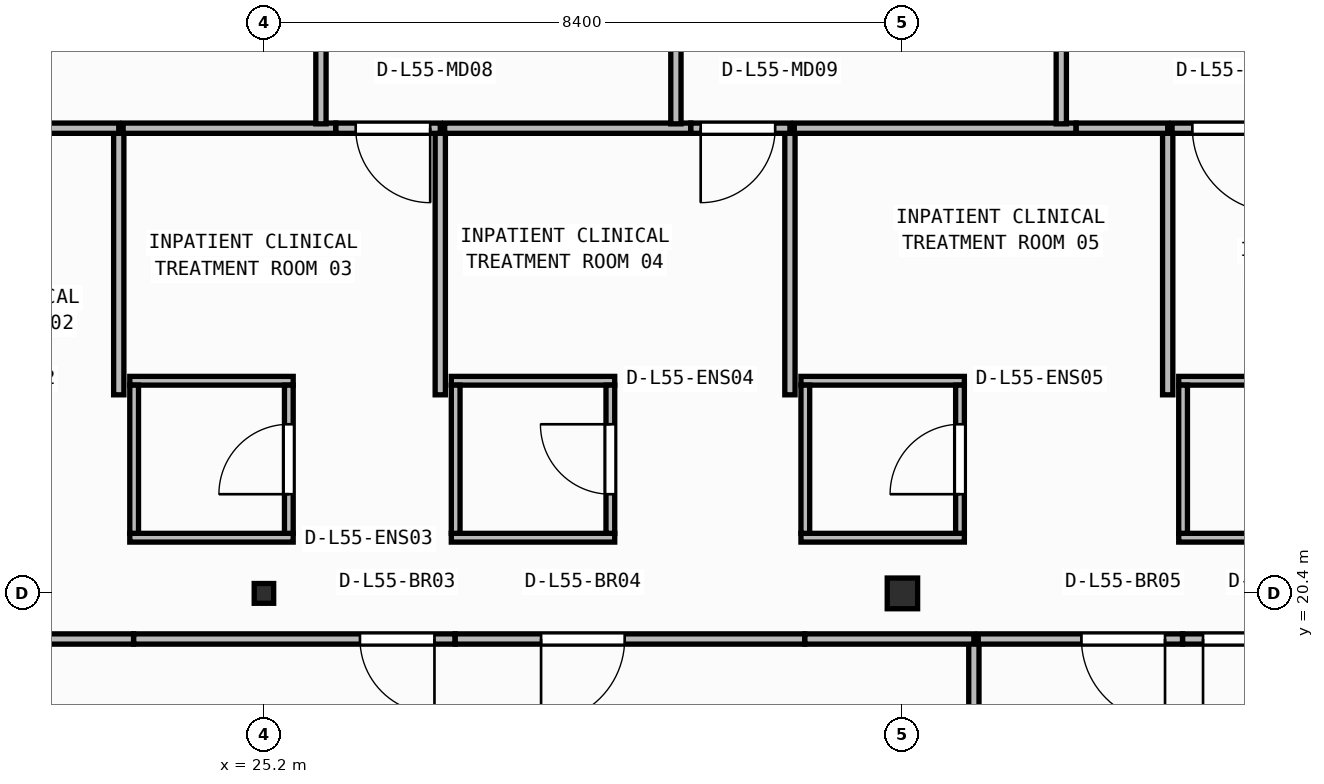
"""IFC4 building model, lengths in metres.
Left out: names, types, materials, properties, quantities, classifications, styles, units other than length and angle.
Written with IfcOpenShell. Run it as: python <this file> out.ifc"""

import sys

from ifc_helpers import new_model, si_unit, direction, frame, frame_2d, origin, origin_2d, place, context, subcontext, project, spatial, rectangle, i_section, extrude, element, fill, save


model = new_model("IFC4")
c1 = context("Model", 3, precision=1e-05, world=origin(), true_north=direction((0.0, 1.0)))
c2 = subcontext(c1, "Body", "Model", "MODEL_VIEW")
j1 = project(units=[si_unit("LENGTHUNIT", "METRE"), si_unit("PLANEANGLEUNIT", "RADIAN")], contexts=[c1])
p1 = place(None, origin())
s1 = spatial("IfcSite", under=j1, at=p1, CompositionType="ELEMENT")
p2 = place(p1, origin())
s2 = spatial("IfcBuilding", under=s1, at=p2, CompositionType="ELEMENT")
p3 = place(p2, frame((0.0, 0.0, 223.7)))
s3 = spatial("IfcBuildingStorey", under=s2, at=p3, CompositionType="ELEMENT", Elevation=223.7)
p4 = place(p3, frame((25.2, 20.4, 0.0), z_axis=(0.0, 0.0, 1.0), x_axis=(1.0, 0.0, 0.0)))
e1 = element("IfcColumn", 1, at=p4, inside=s3, PredefinedType="COLUMN", context=c2, shape_type="SweptSolid", body=[
    extrude(i_section(OverallWidth=0.256, OverallDepth=0.26, WebThickness=0.01, FlangeThickness=0.017, FilletRadius=0.013, at=origin_2d()), origin(), (0.0, 0.0, 1.0), 3.95),
])
p5 = place(p3, frame((33.6, 20.4, 0.0), z_axis=(0.0, 0.0, 1.0), x_axis=(1.0, 0.0, 0.0)))
e2 = element("IfcColumn", 2, at=p5, inside=s3, PredefinedType="COLUMN", context=c2, shape_type="SweptSolid", body=[
    extrude(i_section(OverallWidth=0.4, OverallDepth=0.404, WebThickness=0.02, FlangeThickness=0.032, at=origin_2d()), origin(), (0.0, 0.0, 1.0), 3.95),
])
for number, where, z_axis, x_axis in (
    (3, (23.435, 21.133, 0.0), (0.0, 0.0, 1.0), (1.0, 0.0, 0.0)),
    (4, (23.435, 23.198, 0.0), (0.0, 0.0, 1.0), (1.0, 0.0, 0.0)),
):
    element("IfcWall", number, at=place(p3, frame(where, z_axis=z_axis, x_axis=x_axis)), inside=s3, PredefinedType="PARTITIONING", context=c2, shape_type="SweptSolid", body=[
        extrude(rectangle(XDim=2.15, YDim=0.115, at=frame_2d((1.075, 0.0))), origin(), (0.0, 0.0, 1.0), 3.71),
    ])
p6 = place(p3, frame((23.492, 21.19, 0.0), z_axis=(0.0, 0.0, 1.0), x_axis=(0.0, 1.0, 0.0)))
e5 = element("IfcWall", 5, at=p6, inside=s3, PredefinedType="PARTITIONING", context=c2, shape_type="SweptSolid", body=[
    extrude(rectangle(XDim=1.95, YDim=0.115, at=frame_2d((0.975, 0.0))), origin(), (0.0, 0.0, 1.0), 3.71),
])
p7 = place(p3, frame((25.528, 21.19, 0.0), z_axis=(0.0, 0.0, 1.0), x_axis=(0.0, 1.0, 0.0)))
e6 = element("IfcWall", 6, at=p7, inside=s3, PredefinedType="PARTITIONING", context=c2, shape_type="SweptSolid", body=[
    extrude(rectangle(XDim=1.95, YDim=0.115, at=frame_2d((0.975, 0.0))), origin(), (0.0, 0.0, 1.0), 3.157),
])
p8 = place(p7, frame((0.515, 0.0, 0.0)))
e7 = element("IfcOpeningElement", 7, at=p8, cuts=e6, PredefinedType="OPENING", context=c2, shape_type="SweptSolid", body=[
    extrude(rectangle(XDim=0.92, YDim=2.1, at=frame_2d((0.46, 1.05))), frame((0.0, 0.067, 0.0), z_axis=(0.0, -1.0, 0.0), x_axis=(1.0, 0.0, 0.0)), (0.0, 0.0, 1.0), 0.135),
])
for number, where, z_axis, x_axis in (
    (8, (27.665, 21.133, 0.0), (0.0, 0.0, 1.0), (1.0, 0.0, 0.0)),
    (9, (27.665, 23.198, 0.0), (0.0, 0.0, 1.0), (1.0, 0.0, 0.0)),
):
    element("IfcWall", number, at=place(p3, frame(where, z_axis=z_axis, x_axis=x_axis)), inside=s3, PredefinedType="PARTITIONING", context=c2, shape_type="SweptSolid", body=[
        extrude(rectangle(XDim=2.15, YDim=0.115, at=frame_2d((1.075, 0.0))), origin(), (0.0, 0.0, 1.0), 3.71),
    ])
p9 = place(p3, frame((27.722, 21.19, 0.0), z_axis=(0.0, 0.0, 1.0), x_axis=(0.0, 1.0, 0.0)))
e10 = element("IfcWall", 10, at=p9, inside=s3, PredefinedType="PARTITIONING", context=c2, shape_type="SweptSolid", body=[
    extrude(rectangle(XDim=1.95, YDim=0.115, at=frame_2d((0.975, 0.0))), origin(), (0.0, 0.0, 1.0), 3.71),
])
p10 = place(p3, frame((29.758, 21.19, 0.0), z_axis=(0.0, 0.0, 1.0), x_axis=(0.0, 1.0, 0.0)))
e11 = element("IfcWall", 11, at=p10, inside=s3, PredefinedType="PARTITIONING", context=c2, shape_type="SweptSolid", body=[
    extrude(rectangle(XDim=1.95, YDim=0.115, at=frame_2d((0.975, 0.0))), origin(), (0.0, 0.0, 1.0), 3.71),
])
p11 = place(p10, frame((0.515, 0.0, 0.0)))
e12 = element("IfcOpeningElement", 12, at=p11, cuts=e11, PredefinedType="OPENING", context=c2, shape_type="SweptSolid", body=[
    extrude(rectangle(XDim=0.92, YDim=2.1, at=frame_2d((0.46, 1.05))), frame((0.0, 0.067, 0.0), z_axis=(0.0, -1.0, 0.0), x_axis=(1.0, 0.0, 0.0)), (0.0, 0.0, 1.0), 0.135),
])
for number, where, z_axis, x_axis in (
    (13, (32.265, 21.133, 0.0), (0.0, 0.0, 1.0), (1.0, 0.0, 0.0)),
    (14, (32.265, 23.198, 0.0), (0.0, 0.0, 1.0), (1.0, 0.0, 0.0)),
):
    element("IfcWall", number, at=place(p3, frame(where, z_axis=z_axis, x_axis=x_axis)), inside=s3, PredefinedType="PARTITIONING", context=c2, shape_type="SweptSolid", body=[
        extrude(rectangle(XDim=2.15, YDim=0.115, at=frame_2d((1.075, 0.0))), origin(), (0.0, 0.0, 1.0), 3.71),
    ])
p12 = place(p3, frame((32.323, 21.19, 0.0), z_axis=(0.0, 0.0, 1.0), x_axis=(0.0, 1.0, 0.0)))
e15 = element("IfcWall", 15, at=p12, inside=s3, PredefinedType="PARTITIONING", context=c2, shape_type="SweptSolid", body=[
    extrude(rectangle(XDim=1.95, YDim=0.115, at=frame_2d((0.975, 0.0))), origin(), (0.0, 0.0, 1.0), 3.71),
])
p13 = place(p3, frame((34.357, 21.19, 0.0), z_axis=(0.0, 0.0, 1.0), x_axis=(0.0, 1.0, 0.0)))
e16 = element("IfcWall", 16, at=p13, inside=s3, PredefinedType="PARTITIONING", context=c2, shape_type="SweptSolid", body=[
    extrude(rectangle(XDim=1.95, YDim=0.115, at=frame_2d((0.975, 0.0))), origin(), (0.0, 0.0, 1.0), 3.71),
])
p14 = place(p13, frame((0.515, 0.0, 0.0)))
e17 = element("IfcOpeningElement", 17, at=p14, cuts=e16, PredefinedType="OPENING", context=c2, shape_type="SweptSolid", body=[
    extrude(rectangle(XDim=0.92, YDim=2.1, at=frame_2d((0.46, 1.05))), frame((0.0, 0.067, 0.0), z_axis=(0.0, -1.0, 0.0), x_axis=(1.0, 0.0, 0.0)), (0.0, 0.0, 1.0), 0.135),
])
for number, where, z_axis, x_axis in (
    (18, (37.235, 21.133, 0.0), (0.0, 0.0, 1.0), (1.0, 0.0, 0.0)),
    (19, (37.235, 23.198, 0.0), (0.0, 0.0, 1.0), (1.0, 0.0, 0.0)),
):
    element("IfcWall", number, at=place(p3, frame(where, z_axis=z_axis, x_axis=x_axis)), inside=s3, PredefinedType="PARTITIONING", context=c2, shape_type="SweptSolid", body=[
        extrude(rectangle(XDim=2.15, YDim=0.115, at=frame_2d((1.075, 0.0))), origin(), (0.0, 0.0, 1.0), 3.71),
    ])
p15 = place(p3, frame((37.292, 21.19, 0.0), z_axis=(0.0, 0.0, 1.0), x_axis=(0.0, 1.0, 0.0)))
e20 = element("IfcWall", 20, at=p15, inside=s3, PredefinedType="PARTITIONING", context=c2, shape_type="SweptSolid", body=[
    extrude(rectangle(XDim=1.95, YDim=0.115, at=frame_2d((0.975, 0.0))), origin(), (0.0, 0.0, 1.0), 3.71),
])
p16 = place(p3, frame((34.54, 14.76, 0.0), z_axis=(0.0, 0.0, 1.0), x_axis=(0.0, 1.0, 0.0)))
e21 = element("IfcWall", 21, at=p16, inside=s3, PredefinedType="PARTITIONING", context=c2, shape_type="SweptSolid", body=[
    extrude(rectangle(XDim=5.04, YDim=0.135, at=frame_2d((2.52, 0.0))), origin(), (0.0, 0.0, 1.0), 3.71),
])
p17 = place(p3, frame((23.485, 19.8, 0.0), z_axis=(0.0, 0.0, 1.0), x_axis=(-1.0, 0.0, 0.0)))
e22 = element("IfcWall", 22, at=p17, inside=s3, PredefinedType="PARTITIONING", context=c2, shape_type="SweptSolid", body=[
    extrude(rectangle(XDim=4.968, YDim=0.135, at=frame_2d((2.484, 0.0))), origin(), (0.0, 0.0, 1.0), 3.71),
])
p18 = place(p17, frame((1.934, 0.0, 0.0)))
e23 = element("IfcOpeningElement", 23, at=p18, cuts=e22, PredefinedType="OPENING", context=c2, shape_type="SweptSolid", body=[
    extrude(rectangle(XDim=1.1, YDim=2.1, at=frame_2d((0.55, 1.05))), frame((0.0, 0.077, 0.0), z_axis=(0.0, -1.0, 0.0), x_axis=(1.0, 0.0, 0.0)), (0.0, 0.0, 1.0), 0.155),
])
p19 = place(p3, frame((27.715, 19.8, 0.0), z_axis=(0.0, 0.0, 1.0), x_axis=(-1.0, 0.0, 0.0)))
e24 = element("IfcWall", 24, at=p19, inside=s3, PredefinedType="PARTITIONING", context=c2, shape_type="SweptSolid", body=[
    extrude(rectangle(XDim=4.228, YDim=0.135, at=frame_2d((2.114, 0.0))), origin(), (0.0, 0.0, 1.0), 3.71),
])
p20 = place(p19, frame((0.271, 0.0, 0.0)))
e25 = element("IfcOpeningElement", 25, at=p20, cuts=e24, PredefinedType="OPENING", context=c2, shape_type="SweptSolid", body=[
    extrude(rectangle(XDim=0.98, YDim=2.1, at=frame_2d((0.49, 1.05))), frame((0.0, 0.077, 0.0), z_axis=(0.0, -1.0, 0.0), x_axis=(1.0, 0.0, 0.0)), (0.0, 0.0, 1.0), 0.155),
])
p21 = place(p3, frame((32.315, 19.8, 0.0), z_axis=(0.0, 0.0, 1.0), x_axis=(-1.0, 0.0, 0.0)))
e26 = element("IfcWall", 26, at=p21, inside=s3, PredefinedType="PARTITIONING", context=c2, shape_type="SweptSolid", body=[
    extrude(rectangle(XDim=4.598, YDim=0.135, at=frame_2d((2.299, 0.0))), origin(), (0.0, 0.0, 1.0), 3.71),
])
p22 = place(p21, frame((2.369, 0.0, 0.0)))
e27 = element("IfcOpeningElement", 27, at=p22, cuts=e26, PredefinedType="OPENING", context=c2, shape_type="SweptSolid", body=[
    extrude(rectangle(XDim=1.1, YDim=2.1, at=frame_2d((0.55, 1.05))), frame((0.0, 0.077, 0.0), z_axis=(0.0, -1.0, 0.0), x_axis=(1.0, 0.0, 0.0)), (0.0, 0.0, 1.0), 0.155),
])
p23 = place(p3, frame((34.54, 19.8, 0.0), z_axis=(0.0, 0.0, 1.0), x_axis=(-1.0, 0.0, 0.0)))
e28 = element("IfcWall", 28, at=p23, inside=s3, PredefinedType="PARTITIONING", context=c2, shape_type="SweptSolid", body=[
    extrude(rectangle(XDim=2.223, YDim=0.135, at=frame_2d((1.112, 0.0))), origin(), (0.0, 0.0, 1.0), 3.71),
])
p24 = place(p3, frame((37.285, 19.8, 0.0), z_axis=(0.0, 0.0, 1.0), x_axis=(-1.0, 0.0, 0.0)))
e29 = element("IfcWall", 29, at=p24, inside=s3, PredefinedType="PARTITIONING", context=c2, shape_type="SweptSolid", body=[
    extrude(rectangle(XDim=2.687, YDim=0.135, at=frame_2d((1.344, 0.0))), origin(), (0.0, 0.0, 1.0), 3.71),
])
p25 = place(p24, frame((0.23, 0.0, 0.0)))
e30 = element("IfcOpeningElement", 30, at=p25, cuts=e29, PredefinedType="OPENING", context=c2, shape_type="SweptSolid", body=[
    extrude(rectangle(XDim=1.1, YDim=2.1, at=frame_2d((0.55, 1.05))), frame((0.0, 0.077, 0.0), z_axis=(0.0, -1.0, 0.0), x_axis=(1.0, 0.0, 0.0)), (0.0, 0.0, 1.0), 0.155),
])
p26 = place(p3, frame((41.515, 19.8, 0.0), z_axis=(0.0, 0.0, 1.0), x_axis=(-1.0, 0.0, 0.0)))
e31 = element("IfcWall", 31, at=p26, inside=s3, PredefinedType="PARTITIONING", context=c2, shape_type="SweptSolid", body=[
    extrude(rectangle(XDim=4.228, YDim=0.135, at=frame_2d((2.114, 0.0))), origin(), (0.0, 0.0, 1.0), 3.71),
])
p27 = place(p26, frame((2.86, 0.0, 0.0)))
e32 = element("IfcOpeningElement", 32, at=p27, cuts=e31, PredefinedType="OPENING", context=c2, shape_type="SweptSolid", body=[
    extrude(rectangle(XDim=1.1, YDim=2.1, at=frame_2d((0.55, 1.05))), frame((0.0, 0.077, 0.0), z_axis=(0.0, -1.0, 0.0), x_axis=(1.0, 0.0, 0.0)), (0.0, 0.0, 1.0), 0.155),
])
p28 = place(p3, frame((23.29, 23.012, 0.0), z_axis=(0.0, 0.0, 1.0), x_axis=(0.0, 1.0, 0.0)))
e33 = element("IfcWall", 33, at=p28, inside=s3, PredefinedType="PARTITIONING", context=c2, shape_type="SweptSolid", body=[
    extrude(rectangle(XDim=3.508, YDim=0.135, at=frame_2d((1.754, 0.0))), origin(), (0.0, 0.0, 1.0), 3.71),
])
p29 = place(p3, frame((23.29, 26.52, 0.0), z_axis=(0.0, 0.0, 1.0), x_axis=(-1.0, 0.0, 0.0)))
e34 = element("IfcWall", 34, at=p29, inside=s3, PredefinedType="PARTITIONING", context=c2, shape_type="SweptSolid", body=[
    extrude(rectangle(XDim=2.624, YDim=0.135, at=frame_2d((1.312, 0.0))), origin(), (0.0, 0.0, 1.0), 3.71),
])
p30 = place(p29, frame((1.295, 0.0, 0.0)))
e35 = element("IfcOpeningElement", 35, at=p30, cuts=e34, PredefinedType="OPENING", context=c2, shape_type="SweptSolid", body=[
    extrude(rectangle(XDim=1.1, YDim=2.1, at=frame_2d((0.55, 1.05))), frame((0.0, 0.077, 0.0), z_axis=(0.0, -1.0, 0.0), x_axis=(1.0, 0.0, 0.0)), (0.0, 0.0, 1.0), 0.155),
])
p31 = place(p3, frame((27.52, 23.012, 0.0), z_axis=(0.0, 0.0, 1.0), x_axis=(0.0, 1.0, 0.0)))
e36 = element("IfcWall", 36, at=p31, inside=s3, PredefinedType="PARTITIONING", context=c2, shape_type="SweptSolid", body=[
    extrude(rectangle(XDim=3.508, YDim=0.135, at=frame_2d((1.754, 0.0))), origin(), (0.0, 0.0, 1.0), 3.71),
])
p32 = place(p3, frame((26.145, 26.52, 0.0), z_axis=(0.0, 0.0, 1.0), x_axis=(-1.0, 0.0, 0.0)))
e37 = element("IfcWall", 37, at=p32, inside=s3, PredefinedType="PARTITIONING", context=c2, shape_type="SweptSolid", body=[
    extrude(rectangle(XDim=2.797, YDim=0.135, at=frame_2d((1.398, 0.0))), origin(), (0.0, 0.0, 1.0), 3.71),
])
p33 = place(p3, frame((27.52, 26.52, 0.0), z_axis=(0.0, 0.0, 1.0), x_axis=(-1.0, 0.0, 0.0)))
e38 = element("IfcWall", 38, at=p33, inside=s3, PredefinedType="PARTITIONING", context=c2, shape_type="SweptSolid", body=[
    extrude(rectangle(XDim=1.374, YDim=0.135, at=frame_2d((0.687, 0.0))), origin(), (0.0, 0.0, 1.0), 3.71),
])
p34 = place(p33, frame((0.133, 0.0, 0.0)))
e39 = element("IfcOpeningElement", 39, at=p34, cuts=e38, PredefinedType="OPENING", context=c2, shape_type="SweptSolid", body=[
    extrude(rectangle(XDim=0.98, YDim=2.1, at=frame_2d((0.49, 1.05))), frame((0.0, 0.077, 0.0), z_axis=(0.0, -1.0, 0.0), x_axis=(1.0, 0.0, 0.0)), (0.0, 0.0, 1.0), 0.155),
])
p35 = place(p3, frame((32.12, 23.012, 0.0), z_axis=(0.0, 0.0, 1.0), x_axis=(0.0, 1.0, 0.0)))
e40 = element("IfcWall", 40, at=p35, inside=s3, PredefinedType="PARTITIONING", context=c2, shape_type="SweptSolid", body=[
    extrude(rectangle(XDim=3.508, YDim=0.135, at=frame_2d((1.754, 0.0))), origin(), (0.0, 0.0, 1.0), 3.71),
])
p36 = place(p3, frame((30.815, 26.52, 0.0), z_axis=(0.0, 0.0, 1.0), x_axis=(-1.0, 0.0, 0.0)))
e41 = element("IfcWall", 41, at=p36, inside=s3, PredefinedType="PARTITIONING", context=c2, shape_type="SweptSolid", body=[
    extrude(rectangle(XDim=3.237, YDim=0.135, at=frame_2d((1.619, 0.0))), origin(), (0.0, 0.0, 1.0), 3.71),
])
p37 = place(p3, frame((32.12, 26.52, 0.0), z_axis=(0.0, 0.0, 1.0), x_axis=(-1.0, 0.0, 0.0)))
e42 = element("IfcWall", 42, at=p37, inside=s3, PredefinedType="PARTITIONING", context=c2, shape_type="SweptSolid", body=[
    extrude(rectangle(XDim=1.303, YDim=0.135, at=frame_2d((0.652, 0.0))), origin(), (0.0, 0.0, 1.0), 3.71),
])
p38 = place(p37, frame((0.194, 0.0, 0.0)))
e43 = element("IfcOpeningElement", 43, at=p38, cuts=e42, PredefinedType="OPENING", context=c2, shape_type="SweptSolid", body=[
    extrude(rectangle(XDim=0.98, YDim=2.1, at=frame_2d((0.49, 1.05))), frame((0.0, 0.077, 0.0), z_axis=(0.0, -1.0, 0.0), x_axis=(1.0, 0.0, 0.0)), (0.0, 0.0, 1.0), 0.155),
])
p39 = place(p3, frame((37.09, 23.012, 0.0), z_axis=(0.0, 0.0, 1.0), x_axis=(0.0, 1.0, 0.0)))
e44 = element("IfcWall", 44, at=p39, inside=s3, PredefinedType="PARTITIONING", context=c2, shape_type="SweptSolid", body=[
    extrude(rectangle(XDim=3.508, YDim=0.135, at=frame_2d((1.754, 0.0))), origin(), (0.0, 0.0, 1.0), 3.71),
])
p40 = place(p3, frame((35.885, 26.52, 0.0), z_axis=(0.0, 0.0, 1.0), x_axis=(-1.0, 0.0, 0.0)))
e45 = element("IfcWall", 45, at=p40, inside=s3, PredefinedType="PARTITIONING", context=c2, shape_type="SweptSolid", body=[
    extrude(rectangle(XDim=3.707, YDim=0.135, at=frame_2d((1.854, 0.0))), origin(), (0.0, 0.0, 1.0), 3.71),
])
p41 = place(p3, frame((37.09, 26.52, 0.0), z_axis=(0.0, 0.0, 1.0), x_axis=(-1.0, 0.0, 0.0)))
e46 = element("IfcWall", 46, at=p41, inside=s3, PredefinedType="PARTITIONING", context=c2, shape_type="SweptSolid", body=[
    extrude(rectangle(XDim=1.203, YDim=0.135, at=frame_2d((0.602, 0.0))), origin(), (0.0, 0.0, 1.0), 3.71),
])
p42 = place(p3, frame((41.32, 26.52, 0.0), z_axis=(0.0, 0.0, 1.0), x_axis=(-1.0, 0.0, 0.0)))
e47 = element("IfcWall", 47, at=p42, inside=s3, PredefinedType="PARTITIONING", context=c2, shape_type="SweptSolid", body=[
    extrude(rectangle(XDim=4.173, YDim=0.135, at=frame_2d((2.086, 0.0))), origin(), (0.0, 0.0, 1.0), 3.71),
])
p43 = place(p42, frame((2.806, 0.0, 0.0)))
e48 = element("IfcOpeningElement", 48, at=p43, cuts=e47, PredefinedType="OPENING", context=c2, shape_type="SweptSolid", body=[
    extrude(rectangle(XDim=1.1, YDim=2.1, at=frame_2d((0.55, 1.05))), frame((0.0, 0.077, 0.0), z_axis=(0.0, -1.0, 0.0), x_axis=(1.0, 0.0, 0.0)), (0.0, 0.0, 1.0), 0.155),
])
p44 = place(p3, frame((25.95, 26.577, 0.0), z_axis=(0.0, 0.0, 1.0), x_axis=(0.0, 1.0, 0.0)))
e49 = element("IfcWall", 49, at=p44, inside=s3, PredefinedType="PARTITIONING", context=c2, shape_type="SweptSolid", body=[
    extrude(rectangle(XDim=4.867, YDim=0.135, at=frame_2d((2.433, 0.0))), origin(), (0.0, 0.0, 1.0), 3.71),
])
p45 = place(p3, frame((30.62, 26.577, 0.0), z_axis=(0.0, 0.0, 1.0), x_axis=(0.0, 1.0, 0.0)))
e50 = element("IfcWall", 50, at=p45, inside=s3, PredefinedType="PARTITIONING", context=c2, shape_type="SweptSolid", body=[
    extrude(rectangle(XDim=4.472, YDim=0.135, at=frame_2d((2.236, 0.0))), origin(), (0.0, 0.0, 1.0), 3.71),
])
p46 = place(p3, frame((35.69, 26.577, 0.0), z_axis=(0.0, 0.0, 1.0), x_axis=(0.0, 1.0, 0.0)))
e51 = element("IfcWall", 51, at=p46, inside=s3, PredefinedType="PARTITIONING", context=c2, shape_type="SweptSolid", body=[
    extrude(rectangle(XDim=4.178, YDim=0.135, at=frame_2d((2.089, 0.0))), origin(), (0.0, 0.0, 1.0), 3.71),
])
p47 = place(p8, origin())
e52 = element("IfcDoor", 52, at=p47, inside=s3, OperationType="SINGLE_SWING_LEFT", PredefinedType="DOOR", context=c2, shape_type="SweptSolid", body=[
    extrude(rectangle(XDim=0.92, YDim=2.1, at=frame_2d((0.46, 1.05))), frame((0.0, 0.025, 0.0), z_axis=(0.0, -1.0, 0.0), x_axis=(1.0, 0.0, 0.0)), (0.0, 0.0, 1.0), 0.05),
])
fill(e7, e52)
p48 = place(p11, origin())
e53 = element("IfcDoor", 53, at=p48, inside=s3, OperationType="SINGLE_SWING_RIGHT", PredefinedType="DOOR", context=c2, shape_type="SweptSolid", body=[
    extrude(rectangle(XDim=0.92, YDim=2.1, at=frame_2d((0.46, 1.05))), frame((0.0, 0.025, 0.0), z_axis=(0.0, -1.0, 0.0), x_axis=(1.0, 0.0, 0.0)), (0.0, 0.0, 1.0), 0.05),
])
fill(e12, e53)
p49 = place(p14, origin())
e54 = element("IfcDoor", 54, at=p49, inside=s3, OperationType="SINGLE_SWING_LEFT", PredefinedType="DOOR", context=c2, shape_type="SweptSolid", body=[
    extrude(rectangle(XDim=0.92, YDim=2.1, at=frame_2d((0.46, 1.05))), frame((0.0, 0.025, 0.0), z_axis=(0.0, -1.0, 0.0), x_axis=(1.0, 0.0, 0.0)), (0.0, 0.0, 1.0), 0.05),
])
fill(e17, e54)
p50 = place(p20, origin())
e55 = element("IfcDoor", 55, at=p50, inside=s3, OperationType="SINGLE_SWING_LEFT", PredefinedType="DOOR", context=c2, shape_type="SweptSolid", body=[
    extrude(rectangle(XDim=0.98, YDim=2.1, at=frame_2d((0.49, 1.05))), frame((0.0, 0.025, 0.0), z_axis=(0.0, -1.0, 0.0), x_axis=(1.0, 0.0, 0.0)), (0.0, 0.0, 1.0), 0.05),
])
fill(e25, e55)
p51 = place(p22, origin())
e56 = element("IfcDoor", 56, at=p51, inside=s3, OperationType="SINGLE_SWING_RIGHT", PredefinedType="DOOR", context=c2, shape_type="SweptSolid", body=[
    extrude(rectangle(XDim=1.1, YDim=2.1, at=frame_2d((0.55, 1.05))), frame((0.0, 0.025, 0.0), z_axis=(0.0, -1.0, 0.0), x_axis=(1.0, 0.0, 0.0)), (0.0, 0.0, 1.0), 0.05),
])
fill(e27, e56)
p52 = place(p25, origin())
e57 = element("IfcDoor", 57, at=p52, inside=s3, OperationType="SINGLE_SWING_LEFT", PredefinedType="DOOR", context=c2, shape_type="SweptSolid", body=[
    extrude(rectangle(XDim=1.1, YDim=2.1, at=frame_2d((0.55, 1.05))), frame((0.0, 0.025, 0.0), z_axis=(0.0, -1.0, 0.0), x_axis=(1.0, 0.0, 0.0)), (0.0, 0.0, 1.0), 0.05),
])
fill(e30, e57)
p53 = place(p27, origin())
e58 = element("IfcDoor", 58, at=p53, inside=s3, OperationType="SINGLE_SWING_RIGHT", PredefinedType="DOOR", context=c2, shape_type="SweptSolid", body=[
    extrude(rectangle(XDim=1.1, YDim=2.1, at=frame_2d((0.55, 1.05))), frame((0.0, 0.025, 0.0), z_axis=(0.0, -1.0, 0.0), x_axis=(1.0, 0.0, 0.0)), (0.0, 0.0, 1.0), 0.05),
])
fill(e32, e58)
p54 = place(p34, origin())
e59 = element("IfcDoor", 59, at=p54, inside=s3, OperationType="SINGLE_SWING_LEFT", PredefinedType="DOOR", context=c2, shape_type="SweptSolid", body=[
    extrude(rectangle(XDim=0.98, YDim=2.1, at=frame_2d((0.49, 1.05))), frame((0.0, 0.025, 0.0), z_axis=(0.0, -1.0, 0.0), x_axis=(1.0, 0.0, 0.0)), (0.0, 0.0, 1.0), 0.05),
])
fill(e39, e59)
p55 = place(p38, origin())
e60 = element("IfcDoor", 60, at=p55, inside=s3, OperationType="SINGLE_SWING_RIGHT", PredefinedType="DOOR", context=c2, shape_type="SweptSolid", body=[
    extrude(rectangle(XDim=0.98, YDim=2.1, at=frame_2d((0.49, 1.05))), frame((0.0, 0.025, 0.0), z_axis=(0.0, -1.0, 0.0), x_axis=(1.0, 0.0, 0.0)), (0.0, 0.0, 1.0), 0.05),
])
fill(e43, e60)
p56 = place(p43, origin())
e61 = element("IfcDoor", 61, at=p56, inside=s3, OperationType="SINGLE_SWING_LEFT", PredefinedType="DOOR", context=c2, shape_type="SweptSolid", body=[
    extrude(rectangle(XDim=1.1, YDim=2.1, at=frame_2d((0.55, 1.05))), frame((0.0, 0.025, 0.0), z_axis=(0.0, -1.0, 0.0), x_axis=(1.0, 0.0, 0.0)), (0.0, 0.0, 1.0), 0.05),
])
fill(e48, e61)
save(model, sys.argv[1])
